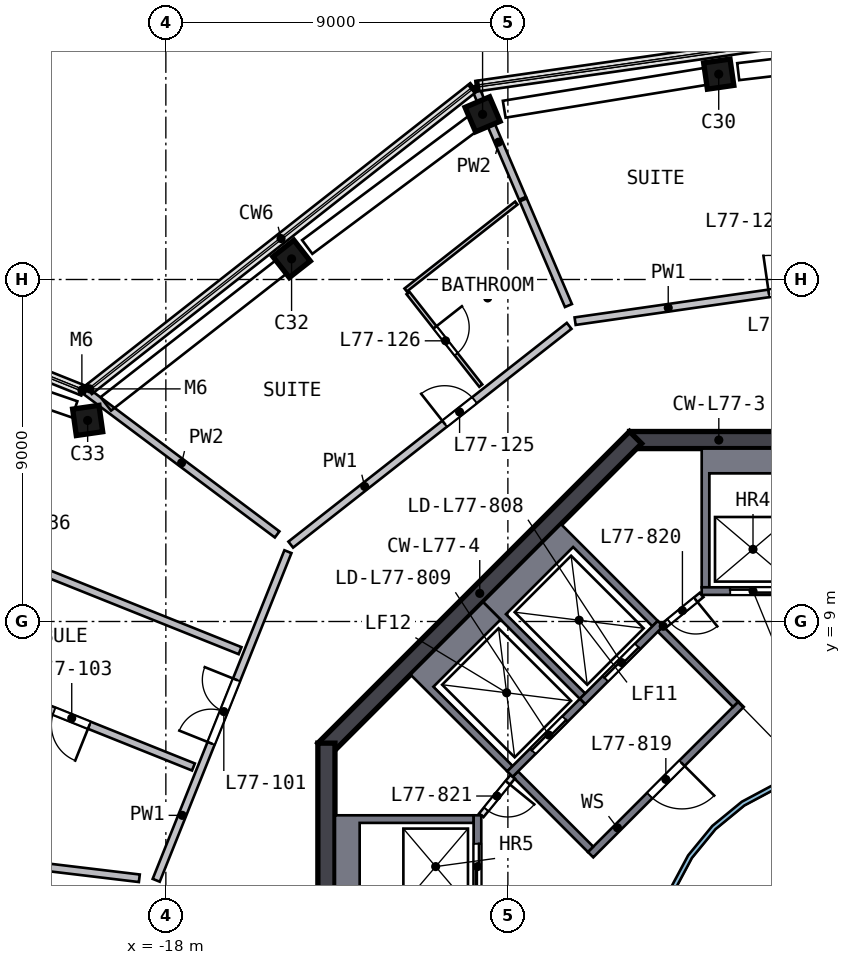
"""IFC4 building model, lengths in metres.
Left out: names, types, materials, properties, quantities, classifications, styles, units other than length and angle.
Written with IfcOpenShell. Run it as: python <this file> out.ifc"""

import sys

from ifc_helpers import new_model, si_unit, direction, frame, frame_2d, origin, origin_2d, place, context, subcontext, project, spatial, polyline, rectangle, outline, extrude, element, fill, save


model = new_model("IFC4")
c1 = context("Model", 3, precision=1e-05, world=origin(), true_north=direction((0.0, 1.0)))
c2 = subcontext(c1, "Body", "Model", "MODEL_VIEW")
j1 = project(units=[si_unit("LENGTHUNIT", "METRE"), si_unit("PLANEANGLEUNIT", "RADIAN")], contexts=[c1])
p1 = place(None, origin())
s1 = spatial("IfcSite", under=j1, at=p1, CompositionType="ELEMENT")
p2 = place(p1, origin())
s2 = spatial("IfcBuilding", under=s1, at=p2, CompositionType="ELEMENT")
p3 = place(p2, frame((0.0, 0.0, 310.0)))
s3 = spatial("IfcBuildingStorey", under=s2, at=p3, CompositionType="ELEMENT", Elevation=310.0)
p4 = place(p3, frame((-3.358, 23.419, 0.0), z_axis=(-0.078143481, -0.011851144, 0.99687168), x_axis=(-0.986826788, -0.141161179, -0.079034246)))
e1 = element("IfcColumn", 1, at=p4, inside=s3, PredefinedType="COLUMN", context=c2, shape_type="SweptSolid", body=[
    extrude(rectangle(XDim=0.7, YDim=0.7, at=origin_2d()), origin(), (0.0, 0.0, 1.0), 4.615),
])
p5 = place(p3, frame((-9.576, 22.386, 0.0), z_axis=(-0.074479333, -0.032584708, 0.996690055), x_axis=(0.916461693, 0.391777358, 0.08129248)))
e2 = element("IfcColumn", 2, at=p5, inside=s3, PredefinedType="COLUMN", context=c2, shape_type="SweptSolid", body=[
    extrude(rectangle(XDim=0.7, YDim=0.7, at=origin_2d()), origin(), (0.0, 0.0, 1.0), 4.615),
])
p6 = place(p3, frame((-14.617, 18.602, 0.0), z_axis=(-0.061742286, -0.049362085, 0.996870741), x_axis=(-0.783840682, -0.615910303, -0.079046088)))
e3 = element("IfcColumn", 3, at=p6, inside=s3, PredefinedType="COLUMN", context=c2, shape_type="SweptSolid", body=[
    extrude(rectangle(XDim=0.7, YDim=0.7, at=origin_2d()), origin(), (0.0, 0.0, 1.0), 4.615),
])
p7 = place(p3, frame((-20.001, 14.372, 0.0), z_axis=(-0.047444978, -0.067226942, 0.996609007), x_axis=(0.988754507, 0.138499205, 0.056413612)))
e4 = element("IfcColumn", 4, at=p7, inside=s3, PredefinedType="COLUMN", context=c2, shape_type="SweptSolid", body=[
    extrude(rectangle(XDim=0.7, YDim=0.7, at=origin_2d()), origin(), (0.0, 0.0, 1.0), 4.616),
])
p8 = place(p3, frame((5.799, 13.775, 0.0), z_axis=(0.0, 0.0, 1.0), x_axis=(-1.0, 0.0, 0.0)))
e5 = element("IfcWall", 5, at=p8, inside=s3, PredefinedType="SHEAR", context=c2, shape_type="SweptSolid", body=[
    extrude(rectangle(XDim=11.598, YDim=0.45, at=frame_2d((5.799, 0.0))), origin(), (0.0, 0.0, 1.0), 5.0),
])
p9 = place(p8, frame((4.899, 0.0, 0.0)))
e6 = element("IfcOpeningElement", 6, at=p9, cuts=e5, PredefinedType="OPENING", context=c2, shape_type="SweptSolid", body=[
    extrude(rectangle(XDim=1.8, YDim=2.1, at=frame_2d((0.9, 1.05))), frame((0.0, 0.235, 0.0), z_axis=(0.0, -1.0, 0.0), x_axis=(1.0, 0.0, 0.0)), (0.0, 0.0, 1.0), 0.47),
])
p10 = place(p3, frame((-5.64, 13.841, 0.0), z_axis=(0.0, 0.0, 1.0), x_axis=(-0.707106781, -0.707106781, 0.0)))
e7 = element("IfcWall", 7, at=p10, inside=s3, PredefinedType="SHEAR", context=c2, shape_type="SweptSolid", body=[
    extrude(rectangle(XDim=11.598, YDim=0.45, at=frame_2d((5.799, 0.0))), origin(), (0.0, 0.0, 1.0), 5.0),
])
p11 = place(p3, frame((-13.775, 5.799, 0.0), z_axis=(0.0, 0.0, 1.0), x_axis=(0.0, -1.0, 0.0)))
e8 = element("IfcWall", 8, at=p11, inside=s3, PredefinedType="SHEAR", context=c2, shape_type="SweptSolid", body=[
    extrude(rectangle(XDim=11.598, YDim=0.45, at=frame_2d((5.799, 0.0))), origin(), (0.0, 0.0, 1.0), 5.0),
])
p12 = place(p11, frame((4.899, 0.0, 0.0)))
e9 = element("IfcOpeningElement", 9, at=p12, cuts=e8, PredefinedType="OPENING", context=c2, shape_type="SweptSolid", body=[
    extrude(rectangle(XDim=1.8, YDim=2.1, at=frame_2d((0.9, 1.05))), frame((0.0, 0.235, 0.0), z_axis=(0.0, -1.0, 0.0), x_axis=(1.0, 0.0, 0.0)), (0.0, 0.0, 1.0), 0.47),
])
p13 = place(p3, origin())
e10 = element("IfcWall", 10, at=p13, inside=s3, PredefinedType="SOLIDWALL", context=c2, shape_type="SweptSolid", body=[
    extrude(outline(polyline([(-3.9, 13.55), (-1.2, 13.55), (-1.2, 9.9), (-1.4, 9.9), (-1.4, 12.9), (-3.7, 12.9), (-3.7, 9.9), (-3.9, 9.9), (-3.9, 13.55)])), origin(), (0.0, 0.0, 1.0), 4.6),
])
p14 = place(p3, frame((-1.2, 9.8, 0.0), z_axis=(0.0, 0.0, 1.0), x_axis=(-1.0, 0.0, 0.0)))
e11 = element("IfcWall", 11, at=p14, inside=s3, PredefinedType="SOLIDWALL", context=c2, shape_type="SweptSolid", body=[
    extrude(rectangle(XDim=2.7, YDim=0.2, at=frame_2d((1.35, 0.0))), origin(), (0.0, 0.0, 1.0), 4.6),
])
p15 = place(p14, frame((0.75, 0.0, 0.0)))
e12 = element("IfcOpeningElement", 12, at=p15, cuts=e11, PredefinedType="OPENING", context=c2, shape_type="SweptSolid", body=[
    extrude(rectangle(XDim=1.2, YDim=2.1, at=frame_2d((0.6, 1.05))), frame((0.0, 0.11, 0.0), z_axis=(0.0, -1.0, 0.0), x_axis=(1.0, 0.0, 0.0)), (0.0, 0.0, 1.0), 0.22),
])
p16 = place(p3, origin())
e13 = element("IfcWall", 13, at=p16, inside=s3, PredefinedType="SOLIDWALL", context=c2, shape_type="SweptSolid", body=[
    extrude(outline(polyline([(-13.55, 3.9), (-9.9, 3.9), (-9.9, 3.7), (-12.9, 3.7), (-12.9, 1.4), (-9.9, 1.4), (-9.9, 1.2), (-13.55, 1.2), (-13.55, 3.9)])), origin(), (0.0, 0.0, 1.0), 4.6),
])
p17 = place(p3, frame((-9.8, 1.2, 0.0), z_axis=(0.0, 0.0, 1.0), x_axis=(0.0, 1.0, 0.0)))
e14 = element("IfcWall", 14, at=p17, inside=s3, PredefinedType="SOLIDWALL", context=c2, shape_type="SweptSolid", body=[
    extrude(rectangle(XDim=2.7, YDim=0.2, at=frame_2d((1.35, 0.0))), origin(), (0.0, 0.0, 1.0), 4.6),
])
p18 = place(p17, frame((0.75, 0.0, 0.0)))
e15 = element("IfcOpeningElement", 15, at=p18, cuts=e14, PredefinedType="OPENING", context=c2, shape_type="SweptSolid", body=[
    extrude(rectangle(XDim=1.2, YDim=2.1, at=frame_2d((0.6, 1.05))), frame((0.0, 0.11, 0.0), z_axis=(0.0, -1.0, 0.0), x_axis=(1.0, 0.0, 0.0)), (0.0, 0.0, 1.0), 0.22),
])
p19 = place(p3, origin())
e16 = element("IfcWall", 16, at=p19, inside=s3, PredefinedType="SOLIDWALL", context=c2, shape_type="SweptSolid", body=[
    extrude(outline(polyline([(-9.652, 9.51), (-7.601, 11.561), (-5.056, 9.016), (-5.197, 8.874), (-7.283, 10.96), (-9.051, 9.192), (-6.965, 7.106), (-7.106, 6.965), (-9.652, 9.51)])), origin(), (0.0, 0.0, 1.0), 4.6),
])
p20 = place(p3, frame((-4.985, 8.945, 0.0), z_axis=(0.0, 0.0, 1.0), x_axis=(-0.707106781, -0.707106781, 0.0)))
e17 = element("IfcWall", 17, at=p20, inside=s3, PredefinedType="SOLIDWALL", context=c2, shape_type="SweptSolid", body=[
    extrude(rectangle(XDim=2.9, YDim=0.2, at=frame_2d((1.45, 0.0))), origin(), (0.0, 0.0, 1.0), 4.6),
])
p21 = place(p20, frame((0.85, 0.0, 0.0)))
e18 = element("IfcOpeningElement", 18, at=p21, cuts=e17, PredefinedType="OPENING", context=c2, shape_type="SweptSolid", body=[
    extrude(rectangle(XDim=1.2, YDim=2.1, at=frame_2d((0.6, 1.05))), frame((0.0, 0.11, 0.0), z_axis=(0.0, -1.0, 0.0), x_axis=(1.0, 0.0, 0.0)), (0.0, 0.0, 1.0), 0.22),
])
p22 = place(p3, origin())
e19 = element("IfcWall", 19, at=p22, inside=s3, PredefinedType="SOLIDWALL", context=c2, shape_type="SweptSolid", body=[
    extrude(outline(polyline([(-11.561, 7.601), (-9.652, 9.51), (-9.192, 9.051), (-10.96, 7.283), (-8.874, 5.197), (-9.016, 5.056), (-11.561, 7.601)])), origin(), (0.0, 0.0, 1.0), 4.6),
])
p23 = place(p3, frame((-7.036, 6.894, 0.0), z_axis=(0.0, 0.0, 1.0), x_axis=(-0.707106781, -0.707106781, 0.0)))
e20 = element("IfcWall", 20, at=p23, inside=s3, PredefinedType="SOLIDWALL", context=c2, shape_type="SweptSolid", body=[
    extrude(rectangle(XDim=2.7, YDim=0.2, at=frame_2d((1.35, 0.0))), origin(), (0.0, 0.0, 1.0), 4.6),
])
p24 = place(p23, frame((0.65, 0.0, 0.0)))
e21 = element("IfcOpeningElement", 21, at=p24, cuts=e20, PredefinedType="OPENING", context=c2, shape_type="SweptSolid", body=[
    extrude(rectangle(XDim=1.2, YDim=2.1, at=frame_2d((0.6, 1.05))), frame((0.0, 0.11, 0.0), z_axis=(0.0, -1.0, 0.0), x_axis=(1.0, 0.0, 0.0)), (0.0, 0.0, 1.0), 0.22),
])
p25 = place(p3, frame((-2.864, 6.823, 0.0), z_axis=(0.0, 0.0, 1.0), x_axis=(-0.707106781, -0.707106781, 0.0)))
e22 = element("IfcWall", 22, at=p25, inside=s3, PredefinedType="SOLIDWALL", context=c2, shape_type="SweptSolid", body=[
    extrude(rectangle(XDim=5.6, YDim=0.2, at=frame_2d((2.8, 0.0))), origin(), (0.0, 0.0, 1.0), 4.6),
])
p26 = place(p25, frame((2.2, 0.0, 0.0)))
e23 = element("IfcOpeningElement", 23, at=p26, cuts=e22, PredefinedType="OPENING", context=c2, shape_type="SweptSolid", body=[
    extrude(rectangle(XDim=1.2, YDim=2.1, at=frame_2d((0.6, 1.05))), frame((0.0, 0.11, 0.0), z_axis=(0.0, -1.0, 0.0), x_axis=(1.0, 0.0, 0.0)), (0.0, 0.0, 1.0), 0.22),
])
for number, where, z_axis, x_axis in (
    (24, (-3.005, 6.823, 0.0), (0.0, 0.0, 1.0), (-0.707, 0.707, 0.0)),
    (25, (-6.823, 3.005, 0.0), (0.0, 0.0, 1.0), (-0.707, 0.707, 0.0)),
):
    element("IfcWall", number, at=place(p3, frame(where, z_axis=z_axis, x_axis=x_axis)), inside=s3, PredefinedType="SOLIDWALL", context=c2, shape_type="SweptSolid", body=[
        extrude(rectangle(XDim=2.8, YDim=0.2, at=frame_2d((1.4, 0.0))), origin(), (0.0, 0.0, 1.0), 4.6),
    ])
p27 = place(p3, frame((-3.9, 9.7, 0.0), z_axis=(0.0, 0.0, 1.0), x_axis=(-0.775559878, -0.631274009, 0.0)))
e26 = element("IfcWall", 26, at=p27, inside=s3, PredefinedType="PARTITIONING", context=c2, shape_type="SweptSolid", body=[
    extrude(rectangle(XDim=1.308, YDim=0.15, at=frame_2d((0.654, 0.0))), origin(), (0.0, 0.0, 1.0), 4.6),
])
p28 = place(p27, frame((0.204, 0.0, 0.0)))
e27 = element("IfcOpeningElement", 27, at=p28, cuts=e26, PredefinedType="OPENING", context=c2, shape_type="SweptSolid", body=[
    extrude(rectangle(XDim=0.9, YDim=2.1, at=frame_2d((0.45, 1.05))), frame((0.0, 0.085, 0.0), z_axis=(0.0, -1.0, 0.0), x_axis=(1.0, 0.0, 0.0)), (0.0, 0.0, 1.0), 0.17),
])
p29 = place(p3, frame((-8.874, 4.914, 0.0), z_axis=(0.0, 0.0, 1.0), x_axis=(-0.631274009, -0.775559878, 0.0)))
e28 = element("IfcWall", 28, at=p29, inside=s3, PredefinedType="PARTITIONING", context=c2, shape_type="SweptSolid", body=[
    extrude(rectangle(XDim=1.308, YDim=0.15, at=frame_2d((0.654, 0.0))), origin(), (0.0, 0.0, 1.0), 4.6),
])
p30 = place(p29, frame((0.204, 0.0, 0.0)))
e29 = element("IfcOpeningElement", 29, at=p30, cuts=e28, PredefinedType="OPENING", context=c2, shape_type="SweptSolid", body=[
    extrude(rectangle(XDim=0.9, YDim=2.1, at=frame_2d((0.45, 1.05))), frame((0.0, 0.085, 0.0), z_axis=(0.0, -1.0, 0.0), x_axis=(1.0, 0.0, 0.0)), (0.0, 0.0, 1.0), 0.17),
])
p31 = place(p3, origin())
e30 = element("IfcWall", 30, at=p31, inside=s3, PredefinedType="SOLIDWALL", context=c2, shape_type="SweptSolid", body=[
    extrude(outline(polyline([(5.021, -0.999), (4.73, -1.959), (4.257, -2.844), (3.62, -3.62), (2.844, -4.257), (1.959, -4.73), (0.999, -5.021), (0.0, -5.12), (-0.999, -5.021), (-1.959, -4.73), (-2.844, -4.257), (-3.62, -3.62), (-4.257, -2.844), (-4.73, -1.959), (-5.021, -0.999), (-5.12, 0.0), (-5.021, 0.999), (-4.73, 1.959), (-4.257, 2.844), (-3.62, 3.62), (-2.844, 4.257), (-1.959, 4.73), (-0.999, 5.021), (0.0, 5.12), (0.999, 5.021), (1.959, 4.73), (2.844, 4.257), (3.62, 3.62), (4.257, 2.844), (4.73, 1.959), (5.021, 0.999), (5.12, 0.0), (5.021, -0.999)]), holes=[polyline([(4.904, 0.976), (4.619, 1.913), (4.157, 2.778), (3.535, 3.535), (2.778, 4.157), (1.913, 4.619), (0.976, 4.904), (0.0, 5.0), (-0.976, 4.904), (-1.913, 4.619), (-2.778, 4.157), (-3.535, 3.535), (-4.157, 2.778), (-4.619, 1.913), (-4.904, 0.976), (-5.0, 0.0), (-4.904, -0.976), (-4.619, -1.913), (-4.157, -2.778), (-3.535, -3.535), (-2.778, -4.157), (-1.913, -4.619), (-0.976, -4.904), (0.0, -5.0), (0.976, -4.904), (1.913, -4.619), (2.778, -4.157), (3.535, -3.535), (4.157, -2.778), (4.619, -1.913), (4.904, -0.976), (5.0, 0.0), (4.904, 0.976)])]), origin(), (0.0, 0.0, 1.0), 4.6),
])
p32 = place(p3, frame((-18.254, 2.19, 0.0), z_axis=(0.0, 0.0, 1.0), x_axis=(0.372014104, 0.928227077, 0.0)))
e31 = element("IfcWall", 31, at=p32, inside=s3, PredefinedType="SOLIDWALL", context=c2, shape_type="SweptSolid", body=[
    extrude(rectangle(XDim=9.316, YDim=0.2, at=frame_2d((4.658, 0.0))), origin(), (0.0, 0.0, 1.0), 4.6),
])
p33 = place(p32, frame((3.882, 0.0, 0.0)))
e32 = element("IfcOpeningElement", 32, at=p33, cuts=e31, PredefinedType="OPENING", context=c2, shape_type="SweptSolid", body=[
    extrude(rectangle(XDim=1.8, YDim=2.1, at=frame_2d((0.9, 1.05))), frame((0.0, 0.11, 0.0), z_axis=(0.0, -1.0, 0.0), x_axis=(1.0, 0.0, 0.0)), (0.0, 0.0, 1.0), 0.22),
])
p34 = place(p3, frame((-14.713, 11.023, 0.0), z_axis=(0.0, 0.0, 1.0), x_axis=(0.786284693, 0.617864372, 0.0)))
e33 = element("IfcWall", 33, at=p34, inside=s3, PredefinedType="SOLIDWALL", context=c2, shape_type="SweptSolid", body=[
    extrude(rectangle(XDim=9.316, YDim=0.2, at=frame_2d((4.658, 0.0))), origin(), (0.0, 0.0, 1.0), 4.6),
])
p35 = place(p34, frame((5.15, 0.0, 0.0)))
e34 = element("IfcOpeningElement", 34, at=p35, cuts=e33, PredefinedType="OPENING", context=c2, shape_type="SweptSolid", body=[
    extrude(rectangle(XDim=1.0, YDim=2.1, at=frame_2d((0.5, 1.05))), frame((0.0, 0.11, 0.0), z_axis=(0.0, -1.0, 0.0), x_axis=(1.0, 0.0, 0.0)), (0.0, 0.0, 1.0), 0.22),
])
p36 = place(p3, frame((-7.231, 16.903, 0.0), z_axis=(0.0, 0.0, 1.0), x_axis=(0.989877038, 0.141927623, 0.0)))
e35 = element("IfcWall", 35, at=p36, inside=s3, PredefinedType="SOLIDWALL", context=c2, shape_type="SweptSolid", body=[
    extrude(rectangle(XDim=9.316, YDim=0.2, at=frame_2d((4.658, 0.0))), origin(), (0.0, 0.0, 1.0), 4.6),
])
p37 = place(p36, frame((5.15, 0.0, 0.0)))
e36 = element("IfcOpeningElement", 36, at=p37, cuts=e35, PredefinedType="OPENING", context=c2, shape_type="SweptSolid", body=[
    extrude(rectangle(XDim=1.0, YDim=2.1, at=frame_2d((0.5, 1.05))), frame((0.0, 0.11, 0.0), z_axis=(0.0, -1.0, 0.0), x_axis=(1.0, 0.0, 0.0)), (0.0, 0.0, 1.0), 0.22),
])
p38 = place(p3, frame((-17.274, 5.171, 0.0), z_axis=(0.0, 0.0, 1.0), x_axis=(-0.928224783, 0.372019828, 0.0)))
e37 = element("IfcWall", 37, at=p38, inside=s3, PredefinedType="SOLIDWALL", context=c2, shape_type="SweptSolid", body=[
    extrude(rectangle(XDim=10.302, YDim=0.2, at=frame_2d((5.151, 0.0))), origin(), (0.0, 0.0, 1.0), 4.6),
])
p39 = place(p38, frame((2.95, 0.0, 0.0)))
e38 = element("IfcOpeningElement", 38, at=p39, cuts=e37, PredefinedType="OPENING", context=c2, shape_type="SweptSolid", body=[
    extrude(rectangle(XDim=1.0, YDim=2.1, at=frame_2d((0.5, 1.05))), frame((0.0, 0.11, 0.0), z_axis=(0.0, -1.0, 0.0), x_axis=(1.0, 0.0, 0.0)), (0.0, 0.0, 1.0), 0.22),
])
p40 = place(p3, frame((-25.61, 12.065, 0.0), z_axis=(0.0, 0.0, 1.0), x_axis=(0.928224783, -0.372019828, 0.0)))
e39 = element("IfcWall", 39, at=p40, inside=s3, PredefinedType="SOLIDWALL", context=c2, shape_type="SweptSolid", body=[
    extrude(rectangle(XDim=10.302, YDim=0.2, at=frame_2d((5.151, 0.0))), origin(), (0.0, 0.0, 1.0), 4.6),
])
p41 = place(p40, frame((2.5, 0.0, 0.0)))
e40 = element("IfcOpeningElement", 40, at=p41, cuts=e39, PredefinedType="OPENING", context=c2, shape_type="SweptSolid", body=[
    extrude(rectangle(XDim=1.0, YDim=2.1, at=frame_2d((0.5, 1.05))), frame((0.0, 0.11, 0.0), z_axis=(0.0, -1.0, 0.0), x_axis=(1.0, 0.0, 0.0)), (0.0, 0.0, 1.0), 0.22),
])
p42 = place(p3, frame((-18.698, 2.243, 0.0), z_axis=(0.0, 0.0, 1.0), x_axis=(-0.992887529, 0.119056102, 0.0)))
e41 = element("IfcWall", 41, at=p42, inside=s3, PredefinedType="SOLIDWALL", context=c2, shape_type="SweptSolid", body=[
    extrude(rectangle(XDim=3.025, YDim=0.2, at=frame_2d((1.512, 0.0))), origin(), (0.0, 0.0, 1.0), 4.6),
])
p43 = place(p3, frame((-20.099, 15.058, 0.0), z_axis=(0.0, 0.0, 1.0), x_axis=(0.800293704, -0.599608195, 0.0)))
e42 = element("IfcWall", 42, at=p43, inside=s3, PredefinedType="SOLIDWALL", context=c2, shape_type="SweptSolid", body=[
    extrude(rectangle(XDim=6.282, YDim=0.2, at=frame_2d((3.141, 0.0))), origin(), (0.0, 0.0, 1.0), 4.6),
])
p44 = place(p3, frame((-8.614, 20.137, 0.0), z_axis=(0.0, 0.0, 1.0), x_axis=(-0.39326776, 0.919423988, 0.0)))
e43 = element("IfcWall", 43, at=p44, inside=s3, PredefinedType="SOLIDWALL", context=c2, shape_type="SweptSolid", body=[
    extrude(rectangle(XDim=3.211, YDim=0.2, at=frame_2d((1.606, 0.0))), origin(), (0.0, 0.0, 1.0), 4.6),
])
p45 = place(p3, frame((-7.406, 17.314, 0.0), z_axis=(0.0, 0.0, 1.0), x_axis=(-0.393344446, 0.919391183, 0.0)))
e44 = element("IfcWall", 44, at=p45, inside=s3, PredefinedType="SOLIDWALL", context=c2, shape_type="SweptSolid", body=[
    extrude(rectangle(XDim=3.025, YDim=0.2, at=frame_2d((1.512, 0.0))), origin(), (0.0, 0.0, 1.0), 4.6),
])
p46 = place(p3, frame((-11.628, 17.644, 0.0), z_axis=(0.0, 0.0, 1.0), x_axis=(0.617842421, -0.786301941, 0.0)))
e45 = element("IfcWall", 45, at=p46, inside=s3, PredefinedType="PARTITIONING", context=c2, shape_type="SweptSolid", body=[
    extrude(rectangle(XDim=3.1, YDim=0.1, at=frame_2d((1.55, 0.0))), origin(), (0.0, 0.0, 1.0), 4.6),
])
p47 = place(p46, frame((1.15, 0.0, 0.0)))
e46 = element("IfcOpeningElement", 46, at=p47, cuts=e45, PredefinedType="OPENING", context=c2, shape_type="SweptSolid", body=[
    extrude(rectangle(XDim=0.9, YDim=2.1, at=frame_2d((0.45, 1.05))), frame((0.0, 0.06, 0.0), z_axis=(0.0, -1.0, 0.0), x_axis=(1.0, 0.0, 0.0)), (0.0, 0.0, 1.0), 0.12),
])
p48 = place(p3, frame((-11.69, 17.723, 0.0), z_axis=(0.0, 0.0, 1.0), x_axis=(0.786279455, 0.617871038, 0.0)))
e47 = element("IfcWall", 47, at=p48, inside=s3, PredefinedType="PARTITIONING", context=c2, shape_type="SweptSolid", body=[
    extrude(rectangle(XDim=3.704, YDim=0.1, at=frame_2d((1.852, 0.0))), origin(), (0.0, 0.0, 1.0), 4.6),
])
p49 = place(p15, origin())
e48 = element("IfcDoor", 48, at=p49, inside=s3, OperationType="DOUBLE_DOOR_SLIDING", PredefinedType="DOOR", context=c2, shape_type="SweptSolid", body=[
    extrude(rectangle(XDim=1.2, YDim=2.1, at=frame_2d((0.6, 1.05))), frame((0.0, 0.025, 0.0), z_axis=(0.0, -1.0, 0.0), x_axis=(1.0, 0.0, 0.0)), (0.0, 0.0, 1.0), 0.05),
])
fill(e12, e48)
p50 = place(p18, origin())
e49 = element("IfcDoor", 49, at=p50, inside=s3, OperationType="DOUBLE_DOOR_SLIDING", PredefinedType="DOOR", context=c2, shape_type="SweptSolid", body=[
    extrude(rectangle(XDim=1.2, YDim=2.1, at=frame_2d((0.6, 1.05))), frame((0.0, 0.025, 0.0), z_axis=(0.0, -1.0, 0.0), x_axis=(1.0, 0.0, 0.0)), (0.0, 0.0, 1.0), 0.05),
])
fill(e15, e49)
p51 = place(p21, origin())
e50 = element("IfcDoor", 50, at=p51, inside=s3, OperationType="DOUBLE_DOOR_SLIDING", PredefinedType="DOOR", context=c2, shape_type="SweptSolid", body=[
    extrude(rectangle(XDim=1.2, YDim=2.1, at=frame_2d((0.6, 1.05))), frame((0.0, 0.025, 0.0), z_axis=(0.0, -1.0, 0.0), x_axis=(1.0, 0.0, 0.0)), (0.0, 0.0, 1.0), 0.05),
])
fill(e18, e50)
p52 = place(p24, origin())
e51 = element("IfcDoor", 51, at=p52, inside=s3, OperationType="DOUBLE_DOOR_SLIDING", PredefinedType="DOOR", context=c2, shape_type="SweptSolid", body=[
    extrude(rectangle(XDim=1.2, YDim=2.1, at=frame_2d((0.6, 1.05))), frame((0.0, 0.025, 0.0), z_axis=(0.0, -1.0, 0.0), x_axis=(1.0, 0.0, 0.0)), (0.0, 0.0, 1.0), 0.05),
])
fill(e21, e51)
p53 = place(p26, origin())
e52 = element("IfcDoor", 52, at=p53, inside=s3, OperationType="SINGLE_SWING_LEFT", PredefinedType="DOOR", context=c2, shape_type="SweptSolid", body=[
    extrude(rectangle(XDim=1.2, YDim=2.1, at=frame_2d((0.6, 1.05))), frame((0.0, 0.025, 0.0), z_axis=(0.0, -1.0, 0.0), x_axis=(1.0, 0.0, 0.0)), (0.0, 0.0, 1.0), 0.05),
])
fill(e23, e52)
p54 = place(p28, origin())
e53 = element("IfcDoor", 53, at=p54, inside=s3, OperationType="SINGLE_SWING_LEFT", PredefinedType="DOOR", context=c2, shape_type="SweptSolid", body=[
    extrude(rectangle(XDim=0.9, YDim=2.1, at=frame_2d((0.45, 1.05))), frame((0.0, 0.025, 0.0), z_axis=(0.0, -1.0, 0.0), x_axis=(1.0, 0.0, 0.0)), (0.0, 0.0, 1.0), 0.05),
])
fill(e27, e53)
p55 = place(p30, origin())
e54 = element("IfcDoor", 54, at=p55, inside=s3, OperationType="SINGLE_SWING_LEFT", PredefinedType="DOOR", context=c2, shape_type="SweptSolid", body=[
    extrude(rectangle(XDim=0.9, YDim=2.1, at=frame_2d((0.45, 1.05))), frame((0.0, 0.025, 0.0), z_axis=(0.0, -1.0, 0.0), x_axis=(1.0, 0.0, 0.0)), (0.0, 0.0, 1.0), 0.05),
])
fill(e29, e54)
p56 = place(p33, origin())
e55 = element("IfcDoor", 55, at=p56, inside=s3, OperationType="DOUBLE_DOOR_SINGLE_SWING", PredefinedType="DOOR", context=c2, shape_type="SweptSolid", body=[
    extrude(rectangle(XDim=1.8, YDim=2.1, at=frame_2d((0.9, 1.05))), frame((0.0, 0.025, 0.0), z_axis=(0.0, -1.0, 0.0), x_axis=(1.0, 0.0, 0.0)), (0.0, 0.0, 1.0), 0.05),
])
fill(e32, e55)
p57 = place(p39, origin())
e56 = element("IfcDoor", 56, at=p57, inside=s3, OperationType="SINGLE_SWING_LEFT", PredefinedType="DOOR", context=c2, shape_type="SweptSolid", body=[
    extrude(rectangle(XDim=1.0, YDim=2.1, at=frame_2d((0.5, 1.05))), frame((0.0, 0.025, 0.0), z_axis=(0.0, -1.0, 0.0), x_axis=(1.0, 0.0, 0.0)), (0.0, 0.0, 1.0), 0.05),
])
fill(e38, e56)
p58 = place(p37, origin())
e57 = element("IfcDoor", 57, at=p58, inside=s3, OperationType="SINGLE_SWING_LEFT", PredefinedType="DOOR", context=c2, shape_type="SweptSolid", body=[
    extrude(rectangle(XDim=1.0, YDim=2.1, at=frame_2d((0.5, 1.05))), frame((0.0, 0.025, 0.0), z_axis=(0.0, -1.0, 0.0), x_axis=(1.0, 0.0, 0.0)), (0.0, 0.0, 1.0), 0.05),
])
fill(e36, e57)
p59 = place(p35, origin())
e58 = element("IfcDoor", 58, at=p59, inside=s3, OperationType="SINGLE_SWING_LEFT", PredefinedType="DOOR", context=c2, shape_type="SweptSolid", body=[
    extrude(rectangle(XDim=1.0, YDim=2.1, at=frame_2d((0.5, 1.05))), frame((0.0, 0.025, 0.0), z_axis=(0.0, -1.0, 0.0), x_axis=(1.0, 0.0, 0.0)), (0.0, 0.0, 1.0), 0.05),
])
fill(e34, e58)
p60 = place(p47, origin())
e59 = element("IfcDoor", 59, at=p60, inside=s3, OperationType="SINGLE_SWING_LEFT", PredefinedType="DOOR", context=c2, shape_type="SweptSolid", body=[
    extrude(rectangle(XDim=0.9, YDim=2.1, at=frame_2d((0.45, 1.05))), frame((0.0, 0.025, 0.0), z_axis=(0.0, -1.0, 0.0), x_axis=(1.0, 0.0, 0.0)), (0.0, 0.0, 1.0), 0.05),
])
fill(e46, e59)
save(model, sys.argv[1])
